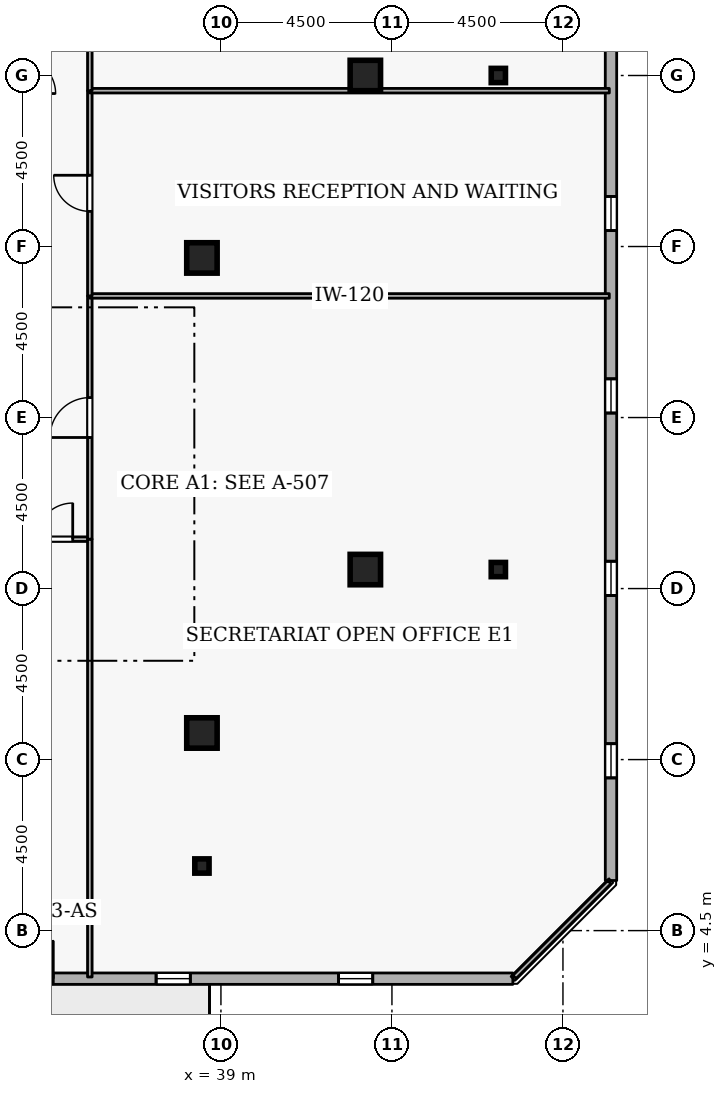
"""IFC4 building model, lengths in metres.
Left out: names, types, materials, properties, quantities, classifications, styles, units other than length and angle.
Written with IfcOpenShell. Run it as: python <this file> out.ifc"""

import sys

from ifc_helpers import new_model, si_unit, direction, frame, frame_2d, origin, origin_2d, place, context, subcontext, project, spatial, rectangle, i_section, extrude, element, fill, save


model = new_model("IFC4")
c1 = context("Model", 3, precision=1e-05, world=origin(), true_north=direction((0.0, 1.0)))
c2 = subcontext(c1, "Body", "Model", "MODEL_VIEW")
j1 = project(units=[si_unit("LENGTHUNIT", "METRE"), si_unit("PLANEANGLEUNIT", "RADIAN")], contexts=[c1])
p1 = place(None, origin())
s1 = spatial("IfcSite", under=j1, at=p1, CompositionType="ELEMENT")
p2 = place(p1, origin())
s2 = spatial("IfcBuilding", under=s1, at=p2, CompositionType="ELEMENT")
p3 = place(p2, frame((0.0, 0.0, 272.7)))
s3 = spatial("IfcBuildingStorey", under=s2, at=p3, CompositionType="ELEMENT", Elevation=272.7)
for number, where, z_axis, x_axis in (
    (1, (38.5, 9.7, 0.0), (0.0, 0.0, 1.0), (1.0, 0.0, 0.0)),
    (2, (42.8, 14.0, 0.0), (0.0, 0.0, 1.0), (1.0, 0.0, 0.0)),
    (3, (42.8, 27.0, 0.0), (0.0, 0.0, 1.0), (1.0, 0.0, 0.0)),
    (4, (38.5, 22.2, 0.0), (0.0, 0.0, 1.0), (1.0, 0.0, 0.0)),
):
    element("IfcColumn", number, at=place(p3, frame(where, z_axis=z_axis, x_axis=x_axis)), inside=s3, PredefinedType="COLUMN", context=c2, shape_type="SweptSolid", body=[
        extrude(rectangle(XDim=0.8, YDim=0.8, at=origin_2d()), origin(), (0.0, 0.0, 1.0), 3.6),
    ])
for number, where, z_axis, x_axis in (
    (5, (38.5, 6.2, 0.0), (0.0, 0.0, 1.0), (1.0, 0.0, 0.0)),
    (6, (46.3, 14.0, 0.0), (0.0, 0.0, 1.0), (1.0, 0.0, 0.0)),
    (7, (46.3, 27.0, 0.0), (0.0, 0.0, 1.0), (1.0, 0.0, 0.0)),
):
    element("IfcColumn", number, at=place(p3, frame(where, z_axis=z_axis, x_axis=x_axis)), inside=s3, PredefinedType="COLUMN", context=c2, shape_type="SweptSolid", body=[
        extrude(i_section(OverallWidth=0.375, OverallDepth=0.375, WebThickness=0.017, FlangeThickness=0.027, FilletRadius=0.015, at=origin_2d()), origin(), (0.0, 0.0, 1.0), 3.6),
    ])
p4 = place(p3, frame((10.594, 3.236, 0.0), z_axis=(0.0, 0.0, 1.0), x_axis=(0.999999999634, -2.7061402e-05, 0.0)))
e8 = element("IfcWall", 8, at=p4, inside=s3, PredefinedType="STANDARD", context=c2, shape_type="SweptSolid", body=[
    extrude(rectangle(XDim=36.087, YDim=0.3, at=frame_2d((18.043, 0.0))), origin(), (0.0, 0.0, 1.0), 2.7),
])
p5 = place(p4, frame((22.993, 0.0, 0.0)))
e9 = element("IfcOpeningElement", 9, at=p5, cuts=e8, PredefinedType="OPENING", context=c2, shape_type="SweptSolid", body=[
    extrude(rectangle(XDim=1.0, YDim=2.08, at=frame_2d((0.5, 1.04))), frame((0.0, 0.16, 0.0), z_axis=(0.0, -1.0, 0.0), x_axis=(1.0, 0.0, 0.0)), (0.0, 0.0, 1.0), 0.32),
])
p6 = place(p4, frame((2.7, 0.0, 0.72)))
e10 = element("IfcOpeningElement", 10, at=p6, cuts=e8, PredefinedType="OPENING", context=c2, shape_type="SweptSolid", body=[
    extrude(rectangle(XDim=0.9, YDim=1.75, at=frame_2d((0.45, 0.875))), frame((0.0, 0.16, 0.0), z_axis=(0.0, -1.0, 0.0), x_axis=(1.0, 0.0, 0.0)), (0.0, 0.0, 1.0), 0.32),
])
p7 = place(p4, frame((7.5, 0.0, 0.72)))
e11 = element("IfcOpeningElement", 11, at=p7, cuts=e8, PredefinedType="OPENING", context=c2, shape_type="SweptSolid", body=[
    extrude(rectangle(XDim=0.9, YDim=1.75, at=frame_2d((0.45, 0.875))), frame((0.0, 0.16, 0.0), z_axis=(0.0, -1.0, 0.0), x_axis=(1.0, 0.0, 0.0)), (0.0, 0.0, 1.0), 0.32),
])
p8 = place(p4, frame((12.3, 0.0, 0.72)))
e12 = element("IfcOpeningElement", 12, at=p8, cuts=e8, PredefinedType="OPENING", context=c2, shape_type="SweptSolid", body=[
    extrude(rectangle(XDim=0.9, YDim=1.75, at=frame_2d((0.45, 0.875))), frame((0.0, 0.16, 0.0), z_axis=(0.0, -1.0, 0.0), x_axis=(1.0, 0.0, 0.0)), (0.0, 0.0, 1.0), 0.32),
])
p9 = place(p4, frame((17.1, 0.0, 0.72)))
e13 = element("IfcOpeningElement", 13, at=p9, cuts=e8, PredefinedType="OPENING", context=c2, shape_type="SweptSolid", body=[
    extrude(rectangle(XDim=0.9, YDim=1.75, at=frame_2d((0.45, 0.875))), frame((0.0, 0.16, 0.0), z_axis=(0.0, -1.0, 0.0), x_axis=(1.0, 0.0, 0.0)), (0.0, 0.0, 1.0), 0.32),
])
p10 = place(p4, frame((26.7, 0.0, 0.72)))
e14 = element("IfcOpeningElement", 14, at=p10, cuts=e8, PredefinedType="OPENING", context=c2, shape_type="SweptSolid", body=[
    extrude(rectangle(XDim=0.9, YDim=1.75, at=frame_2d((0.45, 0.875))), frame((0.0, 0.16, 0.0), z_axis=(0.0, -1.0, 0.0), x_axis=(1.0, 0.0, 0.0)), (0.0, 0.0, 1.0), 0.32),
])
p11 = place(p4, frame((31.5, 0.0, 0.72)))
e15 = element("IfcOpeningElement", 15, at=p11, cuts=e8, PredefinedType="OPENING", context=c2, shape_type="SweptSolid", body=[
    extrude(rectangle(XDim=0.9, YDim=1.75, at=frame_2d((0.45, 0.875))), frame((0.0, 0.16, 0.0), z_axis=(0.0, -1.0, 0.0), x_axis=(1.0, 0.0, 0.0)), (0.0, 0.0, 1.0), 0.32),
])
p12 = place(p3, frame((49.265, 5.819, 0.0), z_axis=(0.0, 0.0, 1.0), x_axis=(-2.7061402e-05, 0.999999999634, 0.0)))
e16 = element("IfcWall", 16, at=p12, inside=s3, PredefinedType="STANDARD", context=c2, shape_type="SweptSolid", body=[
    extrude(rectangle(XDim=36.087, YDim=0.3, at=frame_2d((18.043, 0.0))), origin(), (0.0, 0.0, 1.0), 2.7),
])
p13 = place(p12, frame((2.7, 0.0, 0.72)))
e17 = element("IfcOpeningElement", 17, at=p13, cuts=e16, PredefinedType="OPENING", context=c2, shape_type="SweptSolid", body=[
    extrude(rectangle(XDim=0.9, YDim=1.75, at=frame_2d((0.45, 0.875))), frame((0.0, 0.16, 0.0), z_axis=(0.0, -1.0, 0.0), x_axis=(1.0, 0.0, 0.0)), (0.0, 0.0, 1.0), 0.32),
])
p14 = place(p12, frame((7.5, 0.0, 0.72)))
e18 = element("IfcOpeningElement", 18, at=p14, cuts=e16, PredefinedType="OPENING", context=c2, shape_type="SweptSolid", body=[
    extrude(rectangle(XDim=0.9, YDim=1.75, at=frame_2d((0.45, 0.875))), frame((0.0, 0.16, 0.0), z_axis=(0.0, -1.0, 0.0), x_axis=(1.0, 0.0, 0.0)), (0.0, 0.0, 1.0), 0.32),
])
p15 = place(p12, frame((12.3, 0.0, 0.72)))
e19 = element("IfcOpeningElement", 19, at=p15, cuts=e16, PredefinedType="OPENING", context=c2, shape_type="SweptSolid", body=[
    extrude(rectangle(XDim=0.9, YDim=1.75, at=frame_2d((0.45, 0.875))), frame((0.0, 0.16, 0.0), z_axis=(0.0, -1.0, 0.0), x_axis=(1.0, 0.0, 0.0)), (0.0, 0.0, 1.0), 0.32),
])
p16 = place(p12, frame((17.1, 0.0, 0.72)))
e20 = element("IfcOpeningElement", 20, at=p16, cuts=e16, PredefinedType="OPENING", context=c2, shape_type="SweptSolid", body=[
    extrude(rectangle(XDim=0.9, YDim=1.75, at=frame_2d((0.45, 0.875))), frame((0.0, 0.16, 0.0), z_axis=(0.0, -1.0, 0.0), x_axis=(1.0, 0.0, 0.0)), (0.0, 0.0, 1.0), 0.32),
])
p17 = place(p12, frame((21.9, 0.0, 0.72)))
e21 = element("IfcOpeningElement", 21, at=p17, cuts=e16, PredefinedType="OPENING", context=c2, shape_type="SweptSolid", body=[
    extrude(rectangle(XDim=0.9, YDim=1.75, at=frame_2d((0.45, 0.875))), frame((0.0, 0.16, 0.0), z_axis=(0.0, -1.0, 0.0), x_axis=(1.0, 0.0, 0.0)), (0.0, 0.0, 1.0), 0.32),
])
p18 = place(p12, frame((26.7, 0.0, 0.72)))
e22 = element("IfcOpeningElement", 22, at=p18, cuts=e16, PredefinedType="OPENING", context=c2, shape_type="SweptSolid", body=[
    extrude(rectangle(XDim=0.9, YDim=1.75, at=frame_2d((0.45, 0.875))), frame((0.0, 0.16, 0.0), z_axis=(0.0, -1.0, 0.0), x_axis=(1.0, 0.0, 0.0)), (0.0, 0.0, 1.0), 0.32),
])
p19 = place(p12, frame((31.5, 0.0, 0.72)))
e23 = element("IfcOpeningElement", 23, at=p19, cuts=e16, PredefinedType="OPENING", context=c2, shape_type="SweptSolid", body=[
    extrude(rectangle(XDim=0.9, YDim=1.75, at=frame_2d((0.45, 0.875))), frame((0.0, 0.16, 0.0), z_axis=(0.0, -1.0, 0.0), x_axis=(1.0, 0.0, 0.0)), (0.0, 0.0, 1.0), 0.32),
])
p20 = place(p3, frame((33.7, 14.8, 0.0), z_axis=(0.0, 0.0, 1.0), x_axis=(1.0, 0.0, 0.0)))
e24 = element("IfcWall", 24, at=p20, inside=s3, PredefinedType="PARTITIONING", context=c2, shape_type="SweptSolid", body=[
    extrude(rectangle(XDim=1.85, YDim=0.12, at=frame_2d((0.925, 0.0))), origin(), (0.0, 0.0, 1.0), 3.34),
])
p21 = place(p20, frame((0.45, 0.0, 0.0)))
e25 = element("IfcOpeningElement", 25, at=p21, cuts=e24, PredefinedType="OPENING", context=c2, shape_type="SweptSolid", body=[
    extrude(rectangle(XDim=0.95, YDim=2.1, at=frame_2d((0.475, 1.05))), frame((0.0, 0.07, 0.0), z_axis=(0.0, -1.0, 0.0), x_axis=(1.0, 0.0, 0.0)), (0.0, 0.0, 1.0), 0.14),
])
p22 = place(p3, frame((35.55, 14.8, 0.0), z_axis=(0.0, 0.0, 1.0), x_axis=(0.0, -1.0, 0.0)))
e26 = element("IfcWall", 26, at=p22, inside=s3, PredefinedType="PARTITIONING", context=c2, shape_type="SweptSolid", body=[
    extrude(rectangle(XDim=11.52, YDim=0.12, at=frame_2d((5.76, 0.0))), origin(), (0.0, 0.0, 1.0), 3.34),
])
p23 = place(p3, frame((35.55, 14.8, 0.0), z_axis=(0.0, 0.0, 1.0), x_axis=(0.0, 1.0, 0.0)))
e27 = element("IfcWall", 27, at=p23, inside=s3, PredefinedType="PARTITIONING", context=c2, shape_type="SweptSolid", body=[
    extrude(rectangle(XDim=6.4, YDim=0.12, at=frame_2d((3.2, 0.0))), origin(), (0.0, 0.0, 1.0), 3.34),
])
p24 = place(p23, frame((2.675, 0.0, 0.0)))
e28 = element("IfcOpeningElement", 28, at=p24, cuts=e27, PredefinedType="OPENING", context=c2, shape_type="SweptSolid", body=[
    extrude(rectangle(XDim=1.05, YDim=2.1, at=frame_2d((0.525, 1.05))), frame((0.0, 0.07, 0.0), z_axis=(0.0, -1.0, 0.0), x_axis=(1.0, 0.0, 0.0)), (0.0, 0.0, 1.0), 0.14),
])
p25 = place(p3, frame((35.55, 21.2, 0.0), z_axis=(0.0, 0.0, 1.0), x_axis=(1.0, 0.0, 0.0)))
e29 = element("IfcWall", 29, at=p25, inside=s3, PredefinedType="PARTITIONING", context=c2, shape_type="SweptSolid", body=[
    extrude(rectangle(XDim=13.67, YDim=0.12, at=frame_2d((6.835, 0.0))), origin(), (0.0, 0.0, 1.0), 3.34),
])
p26 = place(p3, frame((49.22, 5.775, 0.0), z_axis=(0.0, 0.0, 1.0), x_axis=(-0.707106781187, -0.707106781187, 0.0)))
e30 = element("IfcWall", 30, at=p26, inside=s3, PredefinedType="PARTITIONING", context=c2, shape_type="SweptSolid", body=[
    extrude(rectangle(XDim=3.528, YDim=0.12, at=frame_2d((1.764, 0.0))), origin(), (0.0, 0.0, 1.0), 3.34),
])
p27 = place(p3, frame((35.55, 21.2, 0.0), z_axis=(0.0, 0.0, 1.0), x_axis=(0.0, 1.0, 0.0)))
e31 = element("IfcWall", 31, at=p27, inside=s3, PredefinedType="PARTITIONING", context=c2, shape_type="SweptSolid", body=[
    extrude(rectangle(XDim=5.4, YDim=0.12, at=frame_2d((2.7, 0.0))), origin(), (0.0, 0.0, 1.0), 3.34),
])
p28 = place(p27, frame((2.225, 0.0, 0.0)))
e32 = element("IfcOpeningElement", 32, at=p28, cuts=e31, PredefinedType="OPENING", context=c2, shape_type="SweptSolid", body=[
    extrude(rectangle(XDim=0.95, YDim=2.1, at=frame_2d((0.475, 1.05))), frame((0.0, 0.07, 0.0), z_axis=(0.0, -1.0, 0.0), x_axis=(1.0, 0.0, 0.0)), (0.0, 0.0, 1.0), 0.14),
])
p29 = place(p3, frame((35.55, 26.6, 0.0), z_axis=(0.0, 0.0, 1.0), x_axis=(1.0, 0.0, 0.0)))
e33 = element("IfcWall", 33, at=p29, inside=s3, PredefinedType="PARTITIONING", context=c2, shape_type="SweptSolid", body=[
    extrude(rectangle(XDim=13.67, YDim=0.12, at=frame_2d((6.835, 0.0))), origin(), (0.0, 0.0, 1.0), 3.34),
])
p30 = place(p3, frame((35.55, 26.6, 0.0), z_axis=(0.0, 0.0, 1.0), x_axis=(0.0, 1.0, 0.0)))
e34 = element("IfcWall", 34, at=p30, inside=s3, PredefinedType="PARTITIONING", context=c2, shape_type="SweptSolid", body=[
    extrude(rectangle(XDim=4.8, YDim=0.12, at=frame_2d((2.4, 0.0))), origin(), (0.0, 0.0, 1.0), 3.34),
])
p31 = place(p30, frame((1.925, 0.0, 0.0)))
e35 = element("IfcOpeningElement", 35, at=p31, cuts=e34, PredefinedType="OPENING", context=c2, shape_type="SweptSolid", body=[
    extrude(rectangle(XDim=0.95, YDim=2.1, at=frame_2d((0.475, 1.05))), frame((0.0, 0.07, 0.0), z_axis=(0.0, -1.0, 0.0), x_axis=(1.0, 0.0, 0.0)), (0.0, 0.0, 1.0), 0.14),
])
p32 = place(p5, origin())
e36 = element("IfcDoor", 36, at=p32, inside=s3, OperationType="SINGLE_SWING_RIGHT", PredefinedType="DOOR", context=c2, shape_type="SweptSolid", body=[
    extrude(rectangle(XDim=1.0, YDim=2.08, at=frame_2d((0.5, 1.04))), frame((0.0, 0.025, 0.0), z_axis=(0.0, -1.0, 0.0), x_axis=(1.0, 0.0, 0.0)), (0.0, 0.0, 1.0), 0.05),
])
fill(e9, e36)
p33 = place(p10, origin())
e37 = element("IfcWindow", 37, at=p33, inside=s3, PartitioningType="SINGLE_PANEL", PredefinedType="WINDOW", context=c2, shape_type="SweptSolid", body=[
    extrude(rectangle(XDim=0.9, YDim=1.75, at=frame_2d((0.45, 0.875))), frame((0.0, 0.03, 0.0), z_axis=(0.0, -1.0, 0.0), x_axis=(1.0, 0.0, 0.0)), (0.0, 0.0, 1.0), 0.06),
])
fill(e14, e37)
p34 = place(p11, origin())
e38 = element("IfcWindow", 38, at=p34, inside=s3, PartitioningType="SINGLE_PANEL", PredefinedType="WINDOW", context=c2, shape_type="SweptSolid", body=[
    extrude(rectangle(XDim=0.9, YDim=1.75, at=frame_2d((0.45, 0.875))), frame((0.0, 0.03, 0.0), z_axis=(0.0, -1.0, 0.0), x_axis=(1.0, 0.0, 0.0)), (0.0, 0.0, 1.0), 0.06),
])
fill(e15, e38)
p35 = place(p13, origin())
e39 = element("IfcWindow", 39, at=p35, inside=s3, PartitioningType="SINGLE_PANEL", PredefinedType="WINDOW", context=c2, shape_type="SweptSolid", body=[
    extrude(rectangle(XDim=0.9, YDim=1.75, at=frame_2d((0.45, 0.875))), frame((0.0, 0.03, 0.0), z_axis=(0.0, -1.0, 0.0), x_axis=(1.0, 0.0, 0.0)), (0.0, 0.0, 1.0), 0.06),
])
fill(e17, e39)
p36 = place(p14, origin())
e40 = element("IfcWindow", 40, at=p36, inside=s3, PartitioningType="SINGLE_PANEL", PredefinedType="WINDOW", context=c2, shape_type="SweptSolid", body=[
    extrude(rectangle(XDim=0.9, YDim=1.75, at=frame_2d((0.45, 0.875))), frame((0.0, 0.03, 0.0), z_axis=(0.0, -1.0, 0.0), x_axis=(1.0, 0.0, 0.0)), (0.0, 0.0, 1.0), 0.06),
])
fill(e18, e40)
p37 = place(p15, origin())
e41 = element("IfcWindow", 41, at=p37, inside=s3, PartitioningType="SINGLE_PANEL", PredefinedType="WINDOW", context=c2, shape_type="SweptSolid", body=[
    extrude(rectangle(XDim=0.9, YDim=1.75, at=frame_2d((0.45, 0.875))), frame((0.0, 0.03, 0.0), z_axis=(0.0, -1.0, 0.0), x_axis=(1.0, 0.0, 0.0)), (0.0, 0.0, 1.0), 0.06),
])
fill(e19, e41)
p38 = place(p16, origin())
e42 = element("IfcWindow", 42, at=p38, inside=s3, PartitioningType="SINGLE_PANEL", PredefinedType="WINDOW", context=c2, shape_type="SweptSolid", body=[
    extrude(rectangle(XDim=0.9, YDim=1.75, at=frame_2d((0.45, 0.875))), frame((0.0, 0.03, 0.0), z_axis=(0.0, -1.0, 0.0), x_axis=(1.0, 0.0, 0.0)), (0.0, 0.0, 1.0), 0.06),
])
fill(e20, e42)
p39 = place(p21, origin())
e43 = element("IfcDoor", 43, at=p39, inside=s3, OperationType="SINGLE_SWING_RIGHT", PredefinedType="DOOR", context=c2, shape_type="SweptSolid", body=[
    extrude(rectangle(XDim=0.95, YDim=2.1, at=frame_2d((0.475, 1.05))), frame((0.0, 0.025, 0.0), z_axis=(0.0, -1.0, 0.0), x_axis=(1.0, 0.0, 0.0)), (0.0, 0.0, 1.0), 0.05),
])
fill(e25, e43)
p40 = place(p24, origin())
e44 = element("IfcDoor", 44, at=p40, inside=s3, OperationType="SINGLE_SWING_LEFT", PredefinedType="DOOR", context=c2, shape_type="SweptSolid", body=[
    extrude(rectangle(XDim=1.05, YDim=2.1, at=frame_2d((0.525, 1.05))), frame((0.0, 0.025, 0.0), z_axis=(0.0, -1.0, 0.0), x_axis=(1.0, 0.0, 0.0)), (0.0, 0.0, 1.0), 0.05),
])
fill(e28, e44)
p41 = place(p28, origin())
e45 = element("IfcDoor", 45, at=p41, inside=s3, OperationType="SINGLE_SWING_RIGHT", PredefinedType="DOOR", context=c2, shape_type="SweptSolid", body=[
    extrude(rectangle(XDim=0.95, YDim=2.1, at=frame_2d((0.475, 1.05))), frame((0.0, 0.025, 0.0), z_axis=(0.0, -1.0, 0.0), x_axis=(1.0, 0.0, 0.0)), (0.0, 0.0, 1.0), 0.05),
])
fill(e32, e45)
save(model, sys.argv[1])
